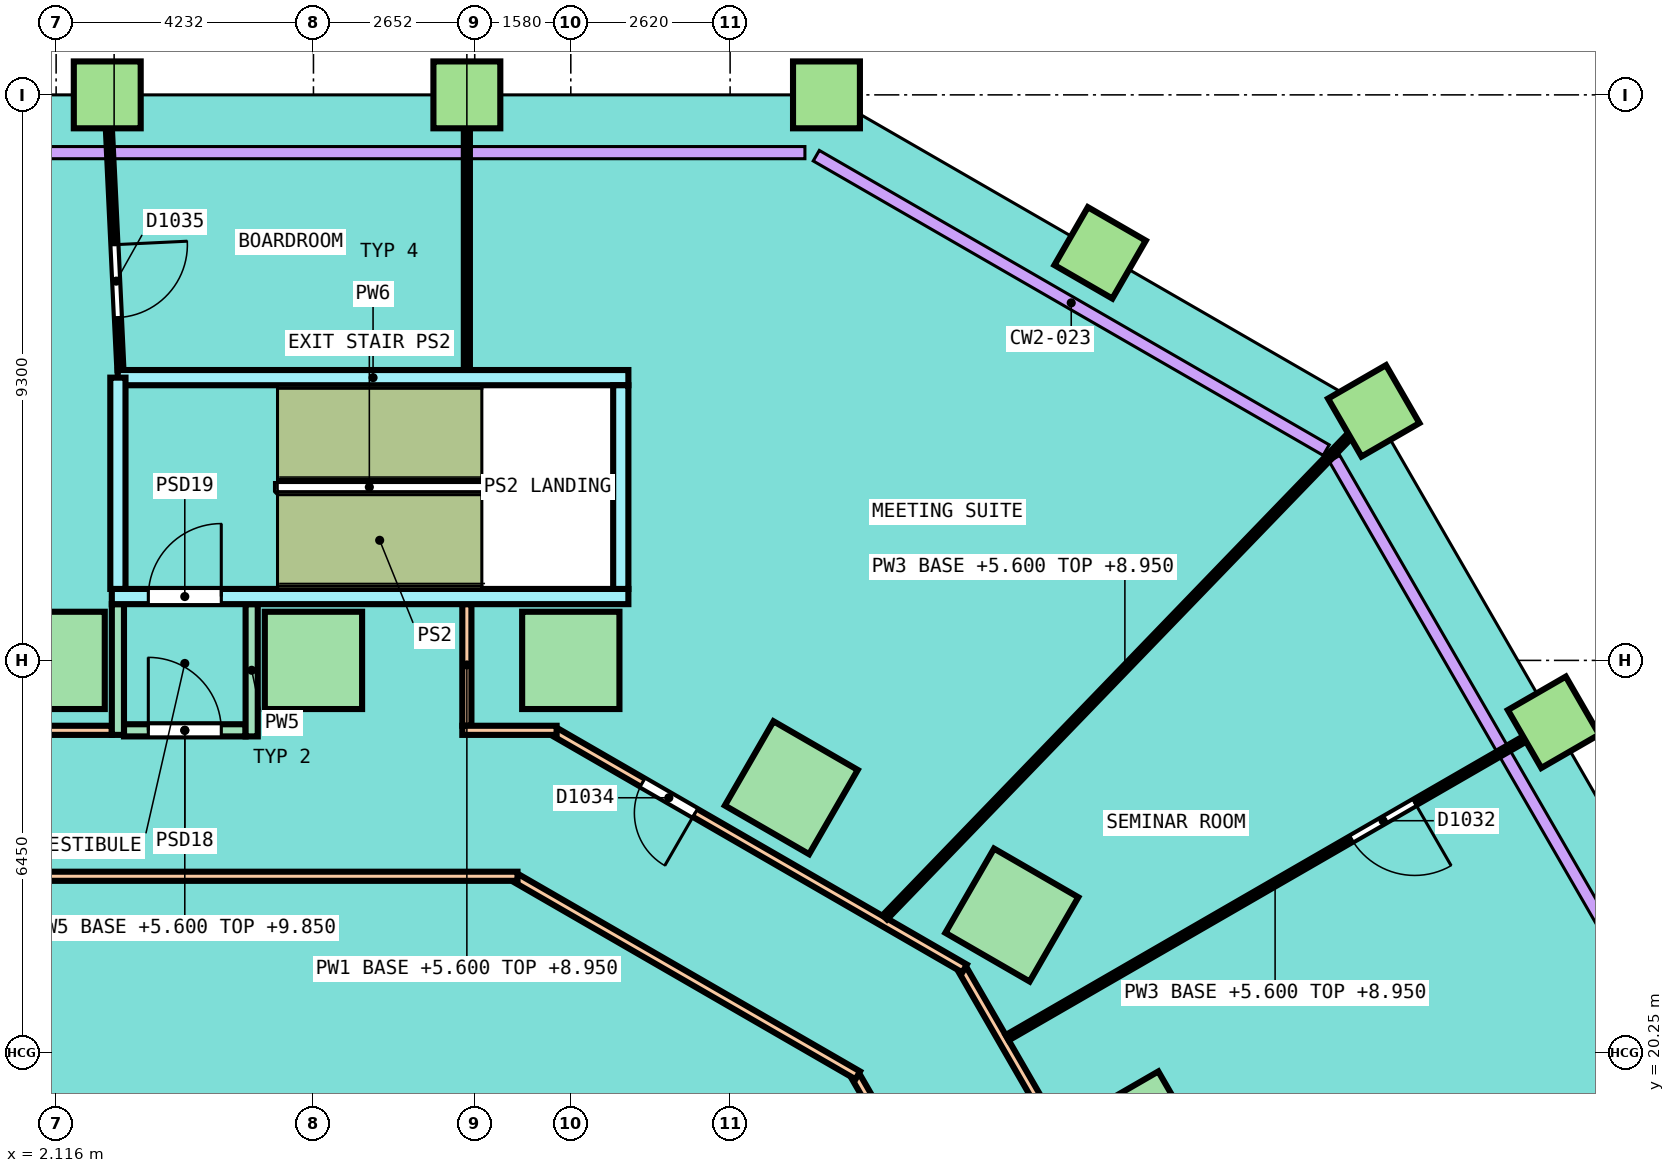
"""IFC4 building model, lengths in metres.
Left out: names, types, materials, properties, quantities, classifications, styles, units other than length and angle.
Written with IfcOpenShell. Run it as: python <this file> out.ifc"""

import sys

from ifc_helpers import new_model, si_unit, direction, frame, frame_2d, origin, origin_2d, place, context, subcontext, project, spatial, rectangle, extrude, element, fill, save


model = new_model("IFC4")
c1 = context("Model", 3, precision=1e-05, world=origin(), true_north=direction((0.0, 1.0)))
c2 = subcontext(c1, "Body", "Model", "MODEL_VIEW")
j1 = project(units=[si_unit("LENGTHUNIT", "METRE"), si_unit("PLANEANGLEUNIT", "RADIAN")], contexts=[c1])
p1 = place(None, origin())
s1 = spatial("IfcSite", under=j1, at=p1, CompositionType="ELEMENT")
p2 = place(p1, origin())
s2 = spatial("IfcBuilding", under=s1, at=p2, CompositionType="ELEMENT")
p3 = place(p2, frame((0.0, 0.0, 5.6)))
s3 = spatial("IfcBuildingStorey", under=s2, at=p3, CompositionType="ELEMENT", Elevation=5.6)
for number, where, z_axis, x_axis in (
    (1, (19.949, 18.847, 0.0), (0.0, 0.0, 1.0), (-0.5, 0.866, 0.0)),
    (2, (17.833, 22.512, 0.0), (0.0, 0.0, 1.0), (-0.866, 0.5, 0.0)),
    (3, (14.206, 24.606, 0.0), (0.0, 0.0, 1.0), (-0.866, 0.5, 0.0)),
    (4, (10.58, 26.7, 0.0), (0.0, 0.0, 1.0), (-1.0, 0.0, 0.0)),
    (5, (6.348, 26.7, 0.0), (0.0, 0.0, 1.0), (-1.0, 0.0, 0.0)),
    (6, (2.116, 26.7, 0.0), (0.0, 0.0, 1.0), (-1.0, 0.0, 0.0)),
):
    element("IfcColumn", number, at=place(p3, frame(where, z_axis=z_axis, x_axis=x_axis)), inside=s3, PredefinedType="COLUMN", context=c2, shape_type="SweptSolid", body=[
        extrude(rectangle(XDim=1.6, YDim=1.6, at=origin_2d()), origin(), (0.0, 0.0, 1.0), 4.25),
    ])
for number, where, z_axis, x_axis in (
    (7, (26.741, 25.682, 0.0), (0.0, 0.0, 1.0), (-0.5, 0.866, 0.0)),
    (8, (23.785, 30.804, 0.0), (0.0, 0.0, 1.0), (-0.5, 0.866, 0.0)),
    (9, (19.285, 33.402, 0.0), (0.0, 0.0, 1.0), (-0.866, 0.5, 0.0)),
    (10, (14.785, 36.0, 0.0), (0.0, 0.0, 1.0), (-1.0, 0.0, 0.0)),
    (11, (8.871, 36.0, 0.0), (0.0, 0.0, 1.0), (-1.0, 0.0, 0.0)),
    (12, (2.957, 36.0, 0.0), (0.0, 0.0, 1.0), (-1.0, 0.0, 0.0)),
):
    element("IfcColumn", number, at=place(p3, frame(where, z_axis=z_axis, x_axis=x_axis)), inside=s3, PredefinedType="COLUMN", context=c2, shape_type="SweptSolid", body=[
        extrude(rectangle(XDim=1.1, YDim=1.1, at=origin_2d()), origin(), (0.0, 0.0, 1.0), 4.25),
    ])
p4 = place(p3, frame((15.272, 19.849, 0.0), z_axis=(0.0, 0.0, 1.0), x_axis=(0.500000635496, -0.86602503688, 0.0)))
e13 = element("IfcWall", 13, at=p4, inside=s3, PredefinedType="PARTITIONING", context=c2, shape_type="SweptSolid", body=[
    extrude(rectangle(XDim=13.953, YDim=0.15, at=frame_2d((6.977, 0.0))), origin(), (0.0, 0.0, 1.0), 3.2),
])
p5 = place(p4, frame((9.577, 0.0, 0.0)))
e14 = element("IfcOpeningElement", 14, at=p5, cuts=e13, PredefinedType="OPENING", context=c2, shape_type="SweptSolid", body=[
    extrude(rectangle(XDim=1.0, YDim=2.1, at=frame_2d((0.5, 1.05))), frame((0.0, 0.085, 0.0), z_axis=(0.0, -1.0, 0.0), x_axis=(1.0, 0.0, 0.0)), (0.0, 0.0, 1.0), 0.17),
])
p6 = place(p3, frame((17.029, 21.606, 0.0), z_axis=(0.0, 0.0, 1.0), x_axis=(0.499999139641, -0.866025900512, 0.0)))
e15 = element("IfcWall", 15, at=p6, inside=s3, PredefinedType="PARTITIONING", context=c2, shape_type="SweptSolid", body=[
    extrude(rectangle(XDim=20.394, YDim=0.15, at=frame_2d((10.197, 0.0))), origin(), (0.0, 0.0, 1.0), 3.2),
])
p7 = place(p6, frame((13.746, 0.0, 0.0)))
e16 = element("IfcOpeningElement", 16, at=p7, cuts=e15, PredefinedType="OPENING", context=c2, shape_type="SweptSolid", body=[
    extrude(rectangle(XDim=1.2, YDim=2.1, at=frame_2d((0.6, 1.05))), frame((0.0, 0.085, 0.0), z_axis=(0.0, -1.0, 0.0), x_axis=(1.0, 0.0, 0.0)), (0.0, 0.0, 1.0), 0.17),
])
p8 = place(p3, frame((10.337, 25.512, 0.0), z_axis=(0.0, 0.0, 1.0), x_axis=(0.866023143435, -0.50000391502, 0.0)))
e17 = element("IfcWall", 17, at=p8, inside=s3, PredefinedType="PARTITIONING", context=c2, shape_type="SweptSolid", body=[
    extrude(rectangle(XDim=7.759, YDim=0.15, at=frame_2d((3.879, 0.0))), origin(), (0.0, 0.0, 1.0), 3.2),
])
p9 = place(p8, frame((1.643, 0.0, 0.0)))
e18 = element("IfcOpeningElement", 18, at=p9, cuts=e17, PredefinedType="OPENING", context=c2, shape_type="SweptSolid", body=[
    extrude(rectangle(XDim=1.0, YDim=2.1, at=frame_2d((0.5, 1.05))), frame((0.0, 0.085, 0.0), z_axis=(0.0, -1.0, 0.0), x_axis=(1.0, 0.0, 0.0)), (0.0, 0.0, 1.0), 0.17),
])
p10 = place(p3, frame((9.694, 23.113, 0.0), z_axis=(0.0, 0.0, 1.0), x_axis=(0.866024786089, -0.500001069878, 0.0)))
e19 = element("IfcWall", 19, at=p10, inside=s3, PredefinedType="PARTITIONING", context=c2, shape_type="SweptSolid", body=[
    extrude(rectangle(XDim=6.473, YDim=0.15, at=frame_2d((3.236, 0.0))), origin(), (0.0, 0.0, 1.0), 3.2),
])
p11 = place(p3, frame((-6.225, 23.15, 0.0), z_axis=(0.0, 0.0, 1.0), x_axis=(1.0, 0.0, 0.0)))
e20 = element("IfcWall", 20, at=p11, inside=s3, PredefinedType="PARTITIONING", context=c2, shape_type="SweptSolid", body=[
    extrude(rectangle(XDim=15.929, YDim=0.15, at=frame_2d((7.964, 0.0))), origin(), (0.0, 0.0, 1.0), 3.2),
])
p12 = place(p3, frame((8.871, 25.625, 0.0), z_axis=(0.0, 0.0, 1.0), x_axis=(0.0, 1.0, 0.0)))
e21 = element("IfcWall", 21, at=p12, inside=s3, PredefinedType="PARTITIONING", context=c2, shape_type="SweptSolid", body=[
    extrude(rectangle(XDim=2.0, YDim=0.15, at=frame_2d((1.0, 0.0))), origin(), (0.0, 0.0, 1.0), 3.35),
])
p13 = place(p3, frame((-3.032, 25.55, 0.0), z_axis=(0.0, 0.0, 1.0), x_axis=(1.0, 0.0, 0.0)))
e22 = element("IfcWall", 22, at=p13, inside=s3, PredefinedType="PARTITIONING", context=c2, shape_type="SweptSolid", body=[
    extrude(rectangle(XDim=6.064, YDim=0.15, at=frame_2d((3.032, 0.0))), origin(), (0.0, 0.0, 1.0), 3.2),
])
p14 = place(p13, frame((2.432, 0.0, 0.0)))
e23 = element("IfcOpeningElement", 23, at=p14, cuts=e22, PredefinedType="OPENING", context=c2, shape_type="SweptSolid", body=[
    extrude(rectangle(XDim=1.2, YDim=2.1, at=frame_2d((0.6, 1.05))), frame((0.0, 0.085, 0.0), z_axis=(0.0, -1.0, 0.0), x_axis=(1.0, 0.0, 0.0)), (0.0, 0.0, 1.0), 0.17),
])
p15 = place(p3, frame((8.796, 25.55, 0.0), z_axis=(0.0, 0.0, 1.0), x_axis=(1.0, 0.0, 0.0)))
e24 = element("IfcWall", 24, at=p15, inside=s3, PredefinedType="PARTITIONING", context=c2, shape_type="SweptSolid", body=[
    extrude(rectangle(XDim=1.551, YDim=0.15, at=frame_2d((0.775, 0.0))), origin(), (0.0, 0.0, 1.0), 3.2),
])
p16 = place(p3, frame((3.232, 25.55, 0.0), z_axis=(0.0, 0.0, 1.0), x_axis=(1.0, 0.0, 0.0)))
e25 = element("IfcWall", 25, at=p16, inside=s3, PredefinedType="PARTITIONING", context=c2, shape_type="SweptSolid", body=[
    extrude(rectangle(XDim=2.0, YDim=0.2, at=frame_2d((1.0, 0.0))), origin(), (0.0, 0.0, 1.0), 4.25),
])
p17 = place(p16, frame((0.4, 0.0, 0.0)))
e26 = element("IfcOpeningElement", 26, at=p17, cuts=e25, PredefinedType="OPENING", context=c2, shape_type="SweptSolid", body=[
    extrude(rectangle(XDim=1.2, YDim=2.1, at=frame_2d((0.6, 1.05))), frame((0.0, 0.11, 0.0), z_axis=(0.0, -1.0, 0.0), x_axis=(1.0, 0.0, 0.0)), (0.0, 0.0, 1.0), 0.22),
])
p18 = place(p3, frame((5.332, 25.45, 0.0), z_axis=(0.0, 0.0, 1.0), x_axis=(0.0, 1.0, 0.0)))
e27 = element("IfcWall", 27, at=p18, inside=s3, PredefinedType="PARTITIONING", context=c2, shape_type="SweptSolid", body=[
    extrude(rectangle(XDim=2.175, YDim=0.2, at=frame_2d((1.087, 0.0))), origin(), (0.0, 0.0, 1.0), 3.35),
])
p19 = place(p3, frame((3.132, 25.475, 0.0), z_axis=(0.0, 0.0, 1.0), x_axis=(0.0, 1.0, 0.0)))
e28 = element("IfcWall", 28, at=p19, inside=s3, PredefinedType="PARTITIONING", context=c2, shape_type="SweptSolid", body=[
    extrude(rectangle(XDim=2.15, YDim=0.2, at=frame_2d((1.075, 0.0))), origin(), (0.0, 0.0, 1.0), 3.35),
])
p20 = place(p3, frame((17.757, 20.495, 0.0), z_axis=(0.0, 0.0, 1.0), x_axis=(0.866028554658, 0.499994542487, 0.0)))
e29 = element("IfcWall", 29, at=p20, inside=s3, PredefinedType="PARTITIONING", context=c2, shape_type="SweptSolid", body=[
    extrude(rectangle(XDim=10.175, YDim=0.1, at=frame_2d((5.087, 0.0))), origin(), (0.0, 0.0, 1.0), 3.35),
])
p21 = place(p20, frame((6.538, 0.0, 0.0)))
e30 = element("IfcOpeningElement", 30, at=p21, cuts=e29, PredefinedType="OPENING", context=c2, shape_type="SweptSolid", body=[
    extrude(rectangle(XDim=1.2, YDim=2.1, at=frame_2d((0.6, 1.05))), frame((0.0, 0.06, 0.0), z_axis=(0.0, -1.0, 0.0), x_axis=(1.0, 0.0, 0.0)), (0.0, 0.0, 1.0), 0.12),
])
p22 = place(p3, frame((15.744, 22.475, 0.0), z_axis=(0.0, 0.0, 1.0), x_axis=(0.694530893364, 0.719462881713, 0.0)))
e31 = element("IfcWall", 31, at=p22, inside=s3, PredefinedType="PARTITIONING", context=c2, shape_type="SweptSolid", body=[
    extrude(rectangle(XDim=11.369, YDim=0.1, at=frame_2d((5.685, 0.0))), origin(), (0.0, 0.0, 1.0), 3.35),
])
p23 = place(p3, frame((8.871, 31.475, 0.0), z_axis=(0.0, 0.0, 1.0), x_axis=(0.0, 1.0, 0.0)))
e32 = element("IfcWall", 32, at=p23, inside=s3, PredefinedType="PARTITIONING", context=c2, shape_type="SweptSolid", body=[
    extrude(rectangle(XDim=4.325, YDim=0.1, at=frame_2d((2.163, 0.0))), origin(), (0.0, 0.0, 1.0), 4.25),
])
p24 = place(p3, frame((2.967, 35.8, 0.0), z_axis=(0.0, 0.0, 1.0), x_axis=(0.047755341285, -0.998859062821, 0.0)))
e33 = element("IfcWall", 33, at=p24, inside=s3, PredefinedType="PARTITIONING", context=c2, shape_type="SweptSolid", body=[
    extrude(rectangle(XDim=4.33, YDim=0.1, at=frame_2d((2.165, 0.0))), origin(), (0.0, 0.0, 1.0), 4.25),
])
p25 = place(p24, frame((2.266, 0.0, 0.0)))
e34 = element("IfcOpeningElement", 34, at=p25, cuts=e33, PredefinedType="OPENING", context=c2, shape_type="SweptSolid", body=[
    extrude(rectangle(XDim=1.2, YDim=2.1, at=frame_2d((0.6, 1.05))), frame((0.0, 0.06, 0.0), z_axis=(0.0, -1.0, 0.0), x_axis=(1.0, 0.0, 0.0)), (0.0, 0.0, 1.0), 0.12),
])
p26 = place(p3, frame((3.032, 27.75, 0.0), z_axis=(0.0, 0.0, 1.0), x_axis=(1.0, 0.0, 0.0)))
e35 = element("IfcWall", 35, at=p26, inside=s3, PredefinedType="SOLIDWALL", context=c2, shape_type="SweptSolid", body=[
    extrude(rectangle(XDim=8.495, YDim=0.25, at=frame_2d((4.248, 0.0))), origin(), (0.0, 0.0, 1.0), 4.25),
])
p27 = place(p26, frame((0.6, 0.0, 0.0)))
e36 = element("IfcOpeningElement", 36, at=p27, cuts=e35, PredefinedType="OPENING", context=c2, shape_type="SweptSolid", body=[
    extrude(rectangle(XDim=1.2, YDim=2.1, at=frame_2d((0.6, 1.05))), frame((0.0, 0.135, 0.0), z_axis=(0.0, -1.0, 0.0), x_axis=(1.0, 0.0, 0.0)), (0.0, 0.0, 1.0), 0.27),
])
p28 = place(p3, frame((3.129, 31.35, 0.0), z_axis=(0.0, 0.0, 1.0), x_axis=(1.0, 0.0, 0.0)))
e37 = element("IfcWall", 37, at=p28, inside=s3, PredefinedType="SOLIDWALL", context=c2, shape_type="SweptSolid", body=[
    extrude(rectangle(XDim=8.397, YDim=0.25, at=frame_2d((4.199, 0.0))), origin(), (0.0, 0.0, 1.0), 4.25),
])
p29 = place(p3, frame((3.132, 27.875, 0.0), z_axis=(0.0, 0.0, 1.0), x_axis=(0.0, 1.0, 0.0)))
e38 = element("IfcWall", 38, at=p29, inside=s3, PredefinedType="SOLIDWALL", context=c2, shape_type="SweptSolid", body=[
    extrude(rectangle(XDim=3.475, YDim=0.25, at=frame_2d((1.738, 0.0))), origin(), (0.0, 0.0, 1.0), 4.25),
])
p30 = place(p3, frame((11.402, 27.875, 0.0), z_axis=(0.0, 0.0, 1.0), x_axis=(0.0, 1.0, 0.0)))
e39 = element("IfcWall", 39, at=p30, inside=s3, PredefinedType="SOLIDWALL", context=c2, shape_type="SweptSolid", body=[
    extrude(rectangle(XDim=3.35, YDim=0.25, at=frame_2d((1.675, 0.0))), origin(), (0.0, 0.0, 1.0), 4.25),
])
p31 = place(p21, origin())
e40 = element("IfcDoor", 40, at=p31, inside=s3, OperationType="DOUBLE_DOOR_SINGLE_SWING", PredefinedType="DOOR", context=c2, shape_type="SweptSolid", body=[
    extrude(rectangle(XDim=1.2, YDim=2.1, at=frame_2d((0.6, 1.05))), frame((0.0, 0.025, 0.0), z_axis=(0.0, -1.0, 0.0), x_axis=(1.0, 0.0, 0.0)), (0.0, 0.0, 1.0), 0.05),
])
fill(e30, e40)
p32 = place(p9, origin())
e41 = element("IfcDoor", 41, at=p32, inside=s3, OperationType="SINGLE_SWING_LEFT", PredefinedType="DOOR", context=c2, shape_type="SweptSolid", body=[
    extrude(rectangle(XDim=1.0, YDim=2.1, at=frame_2d((0.5, 1.05))), frame((0.0, 0.025, 0.0), z_axis=(0.0, -1.0, 0.0), x_axis=(1.0, 0.0, 0.0)), (0.0, 0.0, 1.0), 0.05),
])
fill(e18, e41)
p33 = place(p25, origin())
e42 = element("IfcDoor", 42, at=p33, inside=s3, OperationType="DOUBLE_DOOR_SINGLE_SWING", PredefinedType="DOOR", context=c2, shape_type="SweptSolid", body=[
    extrude(rectangle(XDim=1.2, YDim=2.1, at=frame_2d((0.6, 1.05))), frame((0.0, 0.025, 0.0), z_axis=(0.0, -1.0, 0.0), x_axis=(1.0, 0.0, 0.0)), (0.0, 0.0, 1.0), 0.05),
])
fill(e34, e42)
p34 = place(p17, origin())
e43 = element("IfcDoor", 43, at=p34, inside=s3, OperationType="SINGLE_SWING_LEFT", PredefinedType="DOOR", context=c2, shape_type="SweptSolid", body=[
    extrude(rectangle(XDim=1.2, YDim=2.1, at=frame_2d((0.6, 1.05))), frame((0.0, 0.025, 0.0), z_axis=(0.0, -1.0, 0.0), x_axis=(1.0, 0.0, 0.0)), (0.0, 0.0, 1.0), 0.05),
])
fill(e26, e43)
p35 = place(p27, origin())
e44 = element("IfcDoor", 44, at=p35, inside=s3, OperationType="SINGLE_SWING_RIGHT", PredefinedType="DOOR", context=c2, shape_type="SweptSolid", body=[
    extrude(rectangle(XDim=1.2, YDim=2.1, at=frame_2d((0.6, 1.05))), frame((0.0, 0.025, 0.0), z_axis=(0.0, -1.0, 0.0), x_axis=(1.0, 0.0, 0.0)), (0.0, 0.0, 1.0), 0.05),
])
fill(e36, e44)
save(model, sys.argv[1])
